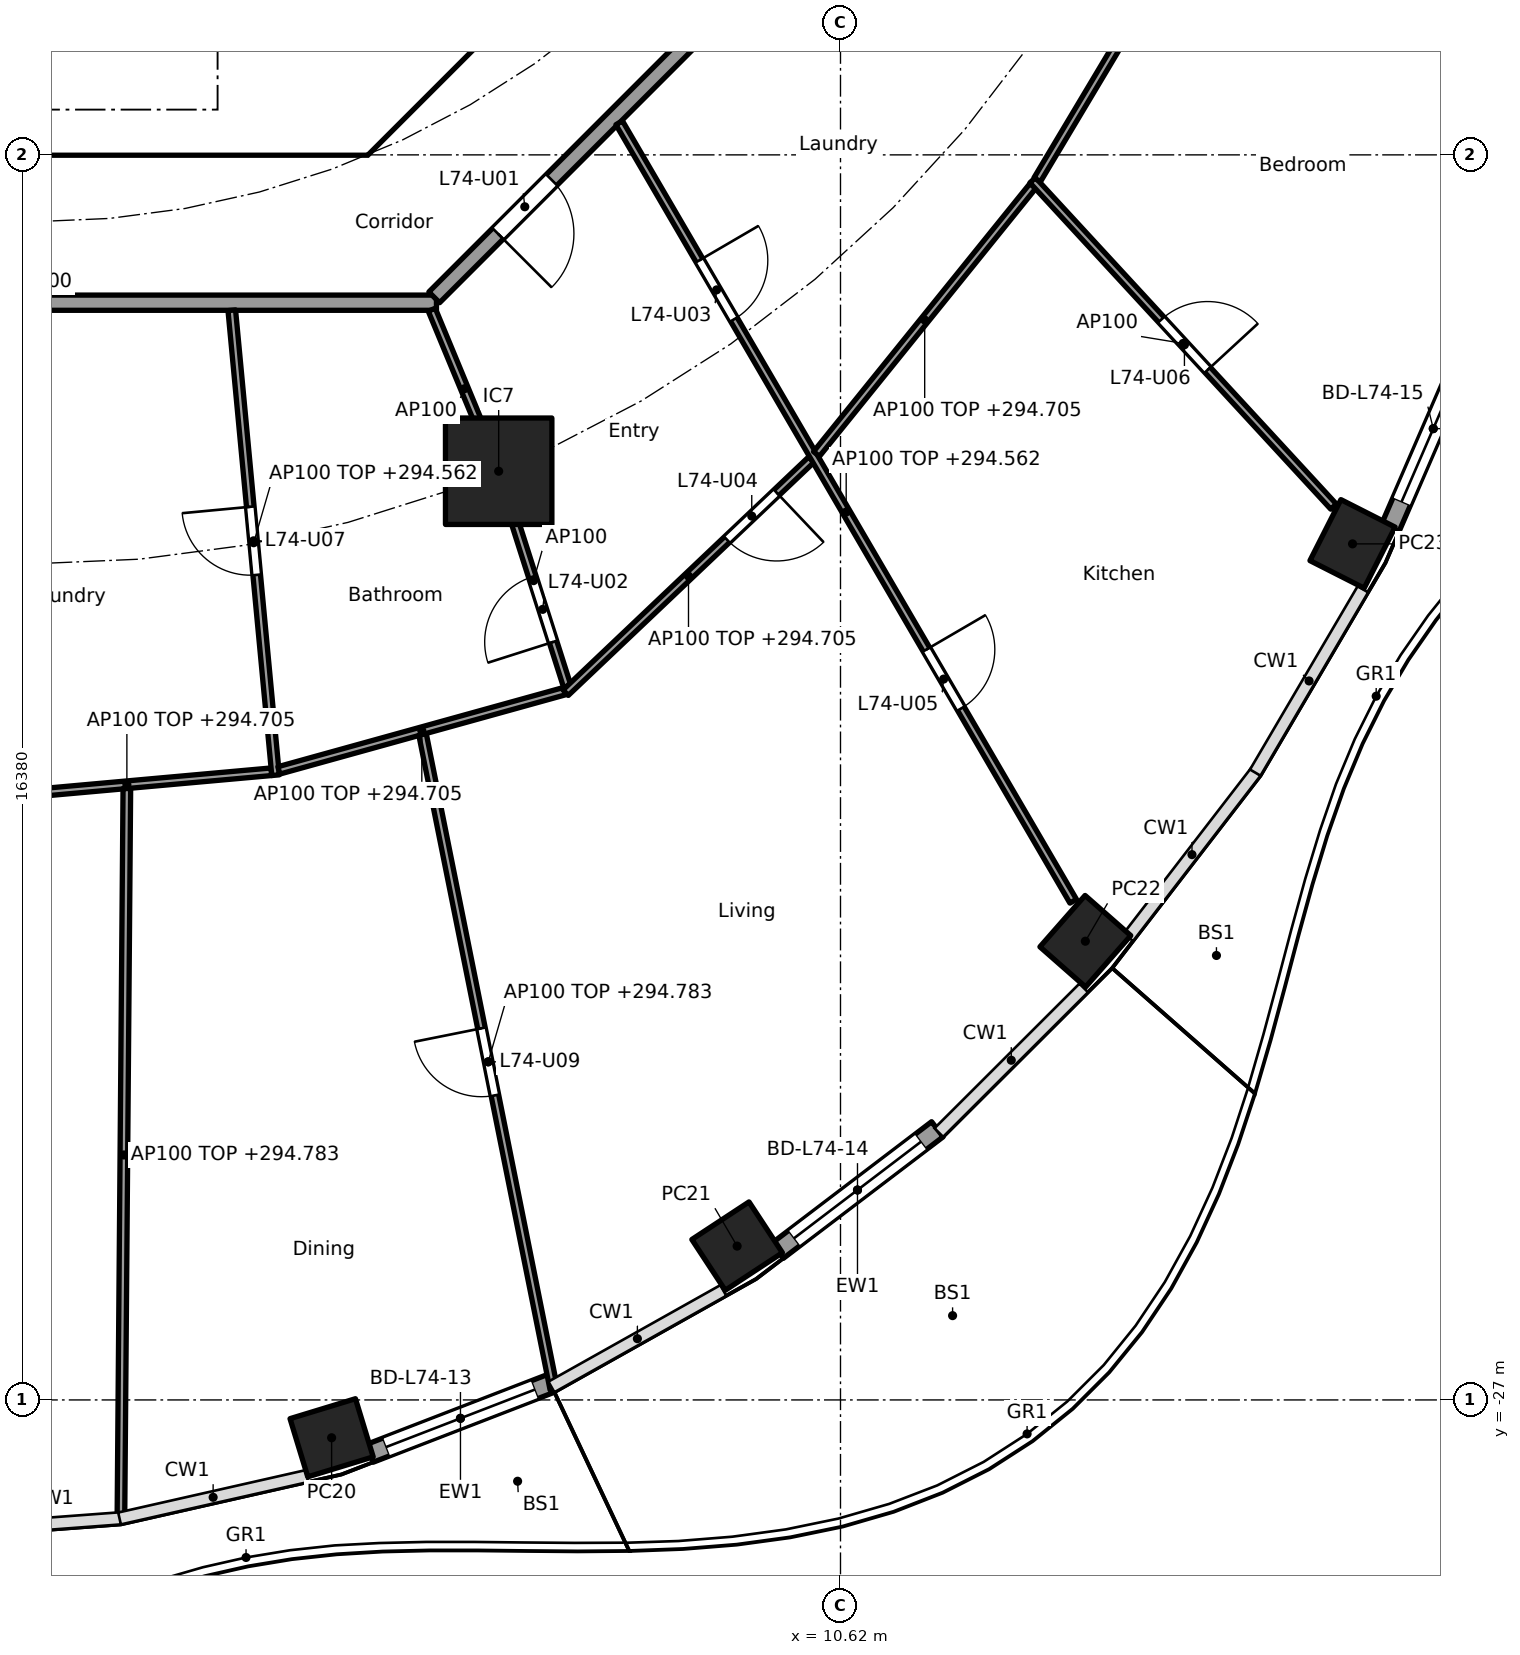
"""IFC4 building model, lengths in metres.
Left out: names, types, materials, properties, quantities, classifications, styles, units other than length and angle.
Written with IfcOpenShell. Run it as: python <this file> out.ifc"""

import sys

from ifc_helpers import new_model, si_unit, direction, frame, frame_2d, origin, origin_2d, place, context, subcontext, project, spatial, polyline, rectangle, hollow_rectangle, outline, extrude, element, fill, save


model = new_model("IFC4")
c1 = context("Model", 3, precision=1e-05, world=origin(), true_north=direction((0.0, 1.0)))
c2 = subcontext(c1, "Body", "Model", "MODEL_VIEW")
j1 = project(units=[si_unit("LENGTHUNIT", "METRE"), si_unit("PLANEANGLEUNIT", "RADIAN")], contexts=[c1])
p1 = place(None, origin())
s1 = spatial("IfcSite", under=j1, at=p1, CompositionType="ELEMENT")
p2 = place(p1, origin())
s2 = spatial("IfcBuilding", under=s1, at=p2, CompositionType="ELEMENT")
p3 = place(p2, frame((0.0, 0.0, 291.8)))
s3 = spatial("IfcBuildingStorey", under=s2, at=p3, CompositionType="ELEMENT", Elevation=291.8)
for number, where, z_axis, x_axis in (
    (1, (3.925, -27.498, 0.0), (0.0, 0.0, 1.0), (0.957, 0.292, 0.0)),
    (2, (9.26, -24.976, 0.0), (0.0, 0.0, 1.0), (0.836, 0.549, 0.0)),
    (3, (13.841, -20.965, 0.0), (0.0, 0.0, 1.0), (0.66, 0.751, 0.0)),
    (4, (17.356, -15.738, 0.0), (0.0, 0.0, 1.0), (0.452, 0.892, 0.0)),
):
    element("IfcColumn", number, at=place(p3, frame(where, z_axis=z_axis, x_axis=x_axis)), inside=s3, PredefinedType="COLUMN", context=c2, shape_type="SweptSolid", body=[
        extrude(hollow_rectangle(XDim=0.9, YDim=0.8, WallThickness=0.028, at=origin_2d()), origin(), (0.0, 0.0, 1.0), 3.7),
    ])
p4 = place(p3, frame((6.123, -14.782, 0.0), z_axis=(0.0, 0.0, 1.0), x_axis=(1.0, 0.0, 0.0)))
e5 = element("IfcColumn", 5, at=p4, inside=s3, PredefinedType="COLUMN", context=c2, shape_type="SweptSolid", body=[
    extrude(rectangle(XDim=1.4, YDim=1.4, at=origin_2d()), origin(), (0.0, 0.0, 1.0), 3.7),
])
p5 = place(p3, frame((6.811, -26.782, 0.0), z_axis=(0.0, 0.0, 1.0), x_axis=(-0.93282223778, -0.360336887792, 0.0)))
e6 = element("IfcWall", 6, at=p5, inside=s3, PredefinedType="SOLIDWALL", context=c2, shape_type="SweptSolid", body=[
    extrude(rectangle(XDim=2.554, YDim=0.25, at=frame_2d((1.277, 0.0))), origin(), (0.0, 0.0, 1.0), 3.44),
])
p6 = place(p5, frame((0.227, 0.0, 0.0)))
e7 = element("IfcOpeningElement", 7, at=p6, cuts=e6, PredefinedType="OPENING", context=c2, shape_type="SweptSolid", body=[
    extrude(rectangle(XDim=2.1, YDim=2.4, at=frame_2d((1.05, 1.2))), frame((0.0, 0.135, 0.0), z_axis=(0.0, -1.0, 0.0), x_axis=(1.0, 0.0, 0.0)), (0.0, 0.0, 1.0), 0.27),
])
p7 = place(p3, frame((11.895, -23.439, 0.0), z_axis=(0.0, 0.0, 1.0), x_axis=(-0.796055284084, -0.605223912847, 0.0)))
e8 = element("IfcWall", 8, at=p7, inside=s3, PredefinedType="SOLIDWALL", context=c2, shape_type="SweptSolid", body=[
    extrude(rectangle(XDim=2.641, YDim=0.25, at=frame_2d((1.32, 0.0))), origin(), (0.0, 0.0, 1.0), 3.44),
])
p8 = place(p7, frame((0.27, 0.0, 0.0)))
e9 = element("IfcOpeningElement", 9, at=p8, cuts=e8, PredefinedType="OPENING", context=c2, shape_type="SweptSolid", body=[
    extrude(rectangle(XDim=2.1, YDim=2.4, at=frame_2d((1.05, 1.2))), frame((0.0, 0.135, 0.0), z_axis=(0.0, -1.0, 0.0), x_axis=(1.0, 0.0, 0.0)), (0.0, 0.0, 1.0), 0.27),
])
p9 = place(p3, frame((18.983, -12.918, 0.0), z_axis=(0.0, 0.0, 1.0), x_axis=(-0.397597791596, -0.9175598052, 0.0)))
e10 = element("IfcWall", 10, at=p9, inside=s3, PredefinedType="SOLIDWALL", context=c2, shape_type="SweptSolid", body=[
    extrude(rectangle(XDim=2.841, YDim=0.25, at=frame_2d((1.42, 0.0))), origin(), (0.0, 0.0, 1.0), 3.44),
])
p10 = place(p9, frame((0.371, 0.0, 0.0)))
e11 = element("IfcOpeningElement", 11, at=p10, cuts=e10, PredefinedType="OPENING", context=c2, shape_type="SweptSolid", body=[
    extrude(rectangle(XDim=2.1, YDim=2.4, at=frame_2d((1.05, 1.2))), frame((0.0, 0.135, 0.0), z_axis=(0.0, -1.0, 0.0), x_axis=(1.0, 0.0, 0.0)), (0.0, 0.0, 1.0), 0.27),
])
p11 = place(p3, frame((4.613, -9.988, 0.0), z_axis=(0.0, 0.0, 1.0), x_axis=(0.707106781187, 0.707106781187, 0.0)))
e12 = element("IfcWall", 12, at=p11, inside=s3, PredefinedType="SHEAR", context=c2, shape_type="SweptSolid", body=[
    extrude(rectangle(XDim=7.602, YDim=0.6, at=frame_2d((3.801, 0.0))), origin(), (0.0, 0.0, 1.0), 3.44),
])
p12 = place(p11, frame((3.201, 0.0, 0.0)))
e13 = element("IfcOpeningElement", 13, at=p12, cuts=e12, PredefinedType="OPENING", context=c2, shape_type="SweptSolid", body=[
    extrude(rectangle(XDim=1.2, YDim=2.1, at=frame_2d((0.6, 1.05))), frame((0.0, 0.31, 0.0), z_axis=(0.0, -1.0, 0.0), x_axis=(1.0, 0.0, 0.0)), (0.0, 0.0, 1.0), 0.62),
])
p13 = place(p3, frame((4.0, -10.025, 0.0), z_axis=(0.0, 0.0, 1.0), x_axis=(0.0, 1.0, 0.0)))
e14 = element("IfcWall", 14, at=p13, inside=s3, PredefinedType="SOLIDWALL", context=c2, shape_type="SweptSolid", body=[
    extrude(rectangle(XDim=3.0, YDim=0.2, at=frame_2d((1.5, 0.0))), origin(), (0.0, 0.0, 1.0), 3.44),
])
p14 = place(p13, frame((0.975, 0.0, 0.0)))
e15 = element("IfcOpeningElement", 15, at=p14, cuts=e14, PredefinedType="OPENING", context=c2, shape_type="SweptSolid", body=[
    extrude(rectangle(XDim=1.1, YDim=2.1, at=frame_2d((0.55, 1.05))), frame((0.0, 0.11, 0.0), z_axis=(0.0, -1.0, 0.0), x_axis=(1.0, 0.0, 0.0)), (0.0, 0.0, 1.0), 0.22),
])
p15 = place(p3, origin())
e16 = element("IfcWall", 16, at=p15, inside=s3, PredefinedType="SHEAR", context=c2, shape_type="SweptSolid", body=[
    extrude(outline(polyline([(-4.152, -10.025), (4.152, -10.025), (4.401, -9.776), (4.825, -10.2), (4.401, -10.625), (-4.401, -10.625), (-4.825, -10.2), (-4.401, -9.776), (-4.152, -10.025)])), origin(), (0.0, 0.0, 1.0), 3.44),
])
p16 = place(p3, frame((14.823, -6.151, 0.0), z_axis=(0.0, 0.0, 1.0), x_axis=(0.821435065081, -0.570302054928, 0.0)))
e17 = element("IfcWall", 17, at=p16, inside=s3, PredefinedType="PARTITIONING", context=c2, shape_type="SweptSolid", body=[
    extrude(rectangle(XDim=5.368, YDim=0.2, at=frame_2d((2.684, 0.0))), origin(), (0.0, 0.0, 1.0), 3.44),
])
p17 = place(p3, frame((-5.104, -12.565, 0.0), z_axis=(0.0, 0.0, 1.0), x_axis=(1.0, 0.0, 0.0)))
e18 = element("IfcWall", 18, at=p17, inside=s3, PredefinedType="PARTITIONING", context=c2, shape_type="SweptSolid", body=[
    extrude(rectangle(XDim=10.409, YDim=0.2, at=frame_2d((5.205, 0.0))), origin(), (0.0, 0.0, 1.0), 3.44),
])
p18 = place(p3, frame((5.275, -12.494, 0.0), z_axis=(0.0, 0.0, 1.0), x_axis=(0.707106781187, 0.707106781187, 0.0)))
e19 = element("IfcWall", 19, at=p18, inside=s3, PredefinedType="PARTITIONING", context=c2, shape_type="SweptSolid", body=[
    extrude(rectangle(XDim=10.409, YDim=0.2, at=frame_2d((5.205, 0.0))), origin(), (0.0, 0.0, 1.0), 3.44),
])
p19 = place(p18, frame((1.185, 0.0, 0.0)))
e20 = element("IfcOpeningElement", 20, at=p19, cuts=e19, PredefinedType="OPENING", context=c2, shape_type="SweptSolid", body=[
    extrude(rectangle(XDim=1.0, YDim=2.1, at=frame_2d((0.5, 1.05))), frame((0.0, 0.11, 0.0), z_axis=(0.0, -1.0, 0.0), x_axis=(1.0, 0.0, 0.0)), (0.0, 0.0, 1.0), 0.22),
])
p20 = place(p3, frame((-0.67, -19.077, 0.0), z_axis=(0.0, 0.0, 1.0), x_axis=(0.995986472869, 0.089503887414, 0.0)))
e21 = element("IfcWall", 21, at=p20, inside=s3, PredefinedType="PARTITIONING", context=c2, shape_type="SweptSolid", body=[
    extrude(rectangle(XDim=3.819, YDim=0.1, at=frame_2d((1.909, 0.0))), origin(), (0.0, 0.0, 1.0), 2.905),
])
p21 = place(p3, frame((1.231, -18.957, 0.0), z_axis=(0.0, 0.0, 1.0), x_axis=(-0.008128577452, -0.999966962569, 0.0)))
e22 = element("IfcWall", 22, at=p21, inside=s3, PredefinedType="PARTITIONING", context=c2, shape_type="SweptSolid", body=[
    extrude(rectangle(XDim=9.641, YDim=0.1, at=frame_2d((4.821, 0.0))), origin(), (0.0, 0.0, 1.0), 2.983),
])
p22 = place(p3, frame((2.612, -12.664, 0.0), z_axis=(0.0, 0.0, 1.0), x_axis=(0.093781393779, -0.995592813444, 0.0)))
e23 = element("IfcWall", 23, at=p22, inside=s3, PredefinedType="PARTITIONING", context=c2, shape_type="SweptSolid", body=[
    extrude(rectangle(XDim=6.144, YDim=0.1, at=frame_2d((3.072, 0.0))), origin(), (0.0, 0.0, 1.0), 2.762),
])
p23 = place(p22, frame((2.597, 0.0, 0.0)))
e24 = element("IfcOpeningElement", 24, at=p23, cuts=e23, PredefinedType="OPENING", context=c2, shape_type="SweptSolid", body=[
    extrude(rectangle(XDim=0.9, YDim=2.1, at=frame_2d((0.45, 1.05))), frame((0.0, 0.06, 0.0), z_axis=(0.0, -1.0, 0.0), x_axis=(1.0, 0.0, 0.0)), (0.0, 0.0, 1.0), 0.12),
])
p24 = place(p3, frame((3.231, -18.718, 0.0), z_axis=(0.0, 0.0, 1.0), x_axis=(0.963601204771, 0.267343820136, 0.0)))
e25 = element("IfcWall", 25, at=p24, inside=s3, PredefinedType="PARTITIONING", context=c2, shape_type="SweptSolid", body=[
    extrude(rectangle(XDim=3.903, YDim=0.1, at=frame_2d((1.952, 0.0))), origin(), (0.0, 0.0, 1.0), 2.905),
])
p25 = place(p3, frame((5.122, -18.245, 0.0), z_axis=(0.0, 0.0, 1.0), x_axis=(0.196554332808, -0.980492934322, 0.0)))
e26 = element("IfcWall", 26, at=p25, inside=s3, PredefinedType="PARTITIONING", context=c2, shape_type="SweptSolid", body=[
    extrude(rectangle(XDim=8.785, YDim=0.1, at=frame_2d((4.393, 0.0))), origin(), (0.0, 0.0, 1.0), 2.983),
])
p26 = place(p25, frame((3.943, 0.0, 0.0)))
e27 = element("IfcOpeningElement", 27, at=p26, cuts=e26, PredefinedType="OPENING", context=c2, shape_type="SweptSolid", body=[
    extrude(rectangle(XDim=0.9, YDim=2.1, at=frame_2d((0.45, 1.05))), frame((0.0, 0.06, 0.0), z_axis=(0.0, -1.0, 0.0), x_axis=(1.0, 0.0, 0.0)), (0.0, 0.0, 1.0), 0.12),
])
p27 = place(p3, frame((5.243, -12.657, 0.0), z_axis=(0.0, 0.0, 1.0), x_axis=(0.382719158442, -0.923864733477, 0.0)))
e28 = element("IfcWall", 28, at=p27, inside=s3, PredefinedType="PARTITIONING", context=c2, shape_type="SweptSolid", body=[
    extrude(rectangle(XDim=2.25, YDim=0.1, at=frame_2d((1.125, 0.0))), origin(), (0.0, 0.0, 1.0), 3.44),
])
p28 = place(p3, frame((6.138, -14.83, 0.0), z_axis=(0.0, 0.0, 1.0), x_axis=(0.303665801704, -0.952778610631, 0.0)))
e29 = element("IfcWall", 29, at=p28, inside=s3, PredefinedType="PARTITIONING", context=c2, shape_type="SweptSolid", body=[
    extrude(rectangle(XDim=2.922, YDim=0.1, at=frame_2d((1.461, 0.0))), origin(), (0.0, 0.0, 1.0), 3.44),
])
p29 = place(p28, frame((1.407, 0.0, 0.0)))
e30 = element("IfcOpeningElement", 30, at=p29, cuts=e29, PredefinedType="OPENING", context=c2, shape_type="SweptSolid", body=[
    extrude(rectangle(XDim=0.9, YDim=2.1, at=frame_2d((0.45, 1.05))), frame((0.0, 0.06, 0.0), z_axis=(0.0, -1.0, 0.0), x_axis=(1.0, 0.0, 0.0)), (0.0, 0.0, 1.0), 0.12),
])
p30 = place(p3, frame((7.004, -17.695, 0.0), z_axis=(0.0, 0.0, 1.0), x_axis=(0.725438442765, 0.68828705186, 0.0)))
e31 = element("IfcWall", 31, at=p30, inside=s3, PredefinedType="PARTITIONING", context=c2, shape_type="SweptSolid", body=[
    extrude(rectangle(XDim=4.456, YDim=0.1, at=frame_2d((2.228, 0.0))), origin(), (0.0, 0.0, 1.0), 2.905),
])
p31 = place(p30, frame((2.925, 0.0, 0.0)))
e32 = element("IfcOpeningElement", 32, at=p31, cuts=e31, PredefinedType="OPENING", context=c2, shape_type="SweptSolid", body=[
    extrude(rectangle(XDim=0.9, YDim=2.1, at=frame_2d((0.45, 1.05))), frame((0.0, 0.06, 0.0), z_axis=(0.0, -1.0, 0.0), x_axis=(1.0, 0.0, 0.0)), (0.0, 0.0, 1.0), 0.12),
])
p32 = place(p3, frame((7.708, -10.198, 0.0), z_axis=(0.0, 0.0, 1.0), x_axis=(0.503839015963, -0.863797572347, 0.0)))
e33 = element("IfcWall", 33, at=p32, inside=s3, PredefinedType="PARTITIONING", context=c2, shape_type="SweptSolid", body=[
    extrude(rectangle(XDim=11.856, YDim=0.1, at=frame_2d((5.928, 0.0))), origin(), (0.0, 0.0, 1.0), 2.762),
])
p33 = place(p32, frame((2.095, 0.0, 0.0)))
e34 = element("IfcOpeningElement", 34, at=p33, cuts=e33, PredefinedType="OPENING", context=c2, shape_type="SweptSolid", body=[
    extrude(rectangle(XDim=0.9, YDim=2.1, at=frame_2d((0.45, 1.05))), frame((0.0, 0.06, 0.0), z_axis=(0.0, -1.0, 0.0), x_axis=(1.0, 0.0, 0.0)), (0.0, 0.0, 1.0), 0.12),
])
p34 = place(p32, frame((8.023, 0.0, 0.0)))
e35 = element("IfcOpeningElement", 35, at=p34, cuts=e33, PredefinedType="OPENING", context=c2, shape_type="SweptSolid", body=[
    extrude(rectangle(XDim=0.9, YDim=2.1, at=frame_2d((0.45, 1.05))), frame((0.0, 0.06, 0.0), z_axis=(0.0, -1.0, 0.0), x_axis=(1.0, 0.0, 0.0)), (0.0, 0.0, 1.0), 0.12),
])
p35 = place(p3, frame((10.304, -14.555, 0.0), z_axis=(0.0, 0.0, 1.0), x_axis=(0.628170338674, 0.778075848237, 0.0)))
e36 = element("IfcWall", 36, at=p35, inside=s3, PredefinedType="PARTITIONING", context=c2, shape_type="SweptSolid", body=[
    extrude(rectangle(XDim=4.532, YDim=0.1, at=frame_2d((2.266, 0.0))), origin(), (0.0, 0.0, 1.0), 2.905),
])
p36 = place(p3, frame((13.149, -10.953, 0.0), z_axis=(0.0, 0.0, 1.0), x_axis=(0.677762562884, -0.735280836384, 0.0)))
e37 = element("IfcWall", 37, at=p36, inside=s3, PredefinedType="PARTITIONING", context=c2, shape_type="SweptSolid", body=[
    extrude(rectangle(XDim=5.841, YDim=0.1, at=frame_2d((2.92, 0.0))), origin(), (0.0, 0.0, 1.0), 3.44),
])
p37 = place(p36, frame((2.495, 0.0, 0.0)))
e38 = element("IfcOpeningElement", 38, at=p37, cuts=e37, PredefinedType="OPENING", context=c2, shape_type="SweptSolid", body=[
    extrude(rectangle(XDim=0.9, YDim=2.1, at=frame_2d((0.45, 1.05))), frame((0.0, 0.06, 0.0), z_axis=(0.0, -1.0, 0.0), x_axis=(1.0, 0.0, 0.0)), (0.0, 0.0, 1.0), 0.12),
])
p38 = place(p3, frame((13.208, -10.947, 0.0), z_axis=(0.0, 0.0, 1.0), x_axis=(0.512726452516, 0.858552028063, 0.0)))
e39 = element("IfcWall", 39, at=p38, inside=s3, PredefinedType="PARTITIONING", context=c2, shape_type="SweptSolid", body=[
    extrude(rectangle(XDim=4.772, YDim=0.1, at=frame_2d((2.386, 0.0))), origin(), (0.0, 0.0, 1.0), 2.905),
])
p39 = place(p6, origin())
e40 = element("IfcDoor", 40, at=p39, inside=s3, OperationType="SLIDING_TO_LEFT", PredefinedType="DOOR", context=c2, shape_type="SweptSolid", body=[
    extrude(rectangle(XDim=2.1, YDim=2.4, at=frame_2d((1.05, 1.2))), frame((0.0, 0.025, 0.0), z_axis=(0.0, -1.0, 0.0), x_axis=(1.0, 0.0, 0.0)), (0.0, 0.0, 1.0), 0.05),
])
fill(e7, e40)
p40 = place(p8, origin())
e41 = element("IfcDoor", 41, at=p40, inside=s3, OperationType="SLIDING_TO_LEFT", PredefinedType="DOOR", context=c2, shape_type="SweptSolid", body=[
    extrude(rectangle(XDim=2.1, YDim=2.4, at=frame_2d((1.05, 1.2))), frame((0.0, 0.025, 0.0), z_axis=(0.0, -1.0, 0.0), x_axis=(1.0, 0.0, 0.0)), (0.0, 0.0, 1.0), 0.05),
])
fill(e9, e41)
p41 = place(p10, origin())
e42 = element("IfcDoor", 42, at=p41, inside=s3, OperationType="SLIDING_TO_LEFT", PredefinedType="DOOR", context=c2, shape_type="SweptSolid", body=[
    extrude(rectangle(XDim=2.1, YDim=2.4, at=frame_2d((1.05, 1.2))), frame((0.0, 0.025, 0.0), z_axis=(0.0, -1.0, 0.0), x_axis=(1.0, 0.0, 0.0)), (0.0, 0.0, 1.0), 0.05),
])
fill(e11, e42)
p42 = place(p19, frame((1.0, 0.0, 0.0), x_axis=(-1.0, 0.0, 0.0)))
e43 = element("IfcDoor", 43, at=p42, inside=s3, OperationType="SINGLE_SWING_RIGHT", PredefinedType="DOOR", context=c2, shape_type="SweptSolid", body=[
    extrude(rectangle(XDim=1.0, YDim=2.1, at=frame_2d((0.5, 1.05))), frame((0.0, 0.025, 0.0), z_axis=(0.0, -1.0, 0.0), x_axis=(1.0, 0.0, 0.0)), (0.0, 0.0, 1.0), 0.05),
])
fill(e20, e43)
p43 = place(p29, frame((0.9, 0.0, 0.0), x_axis=(-1.0, 0.0, 0.0)))
e44 = element("IfcDoor", 44, at=p43, inside=s3, OperationType="SINGLE_SWING_LEFT", PredefinedType="DOOR", context=c2, shape_type="SweptSolid", body=[
    extrude(rectangle(XDim=0.9, YDim=2.1, at=frame_2d((0.45, 1.05))), frame((0.0, 0.025, 0.0), z_axis=(0.0, -1.0, 0.0), x_axis=(1.0, 0.0, 0.0)), (0.0, 0.0, 1.0), 0.05),
])
fill(e30, e44)
p44 = place(p33, origin())
e45 = element("IfcDoor", 45, at=p44, inside=s3, OperationType="SINGLE_SWING_LEFT", PredefinedType="DOOR", context=c2, shape_type="SweptSolid", body=[
    extrude(rectangle(XDim=0.9, YDim=2.1, at=frame_2d((0.45, 1.05))), frame((0.0, 0.025, 0.0), z_axis=(0.0, -1.0, 0.0), x_axis=(1.0, 0.0, 0.0)), (0.0, 0.0, 1.0), 0.05),
])
fill(e34, e45)
p45 = place(p31, frame((0.9, 0.0, 0.0), x_axis=(-1.0, 0.0, 0.0)))
e46 = element("IfcDoor", 46, at=p45, inside=s3, OperationType="SINGLE_SWING_LEFT", PredefinedType="DOOR", context=c2, shape_type="SweptSolid", body=[
    extrude(rectangle(XDim=0.9, YDim=2.1, at=frame_2d((0.45, 1.05))), frame((0.0, 0.025, 0.0), z_axis=(0.0, -1.0, 0.0), x_axis=(1.0, 0.0, 0.0)), (0.0, 0.0, 1.0), 0.05),
])
fill(e32, e46)
p46 = place(p34, origin())
e47 = element("IfcDoor", 47, at=p46, inside=s3, OperationType="SINGLE_SWING_LEFT", PredefinedType="DOOR", context=c2, shape_type="SweptSolid", body=[
    extrude(rectangle(XDim=0.9, YDim=2.1, at=frame_2d((0.45, 1.05))), frame((0.0, 0.025, 0.0), z_axis=(0.0, -1.0, 0.0), x_axis=(1.0, 0.0, 0.0)), (0.0, 0.0, 1.0), 0.05),
])
fill(e35, e47)
p47 = place(p37, origin())
e48 = element("IfcDoor", 48, at=p47, inside=s3, OperationType="SINGLE_SWING_RIGHT", PredefinedType="DOOR", context=c2, shape_type="SweptSolid", body=[
    extrude(rectangle(XDim=0.9, YDim=2.1, at=frame_2d((0.45, 1.05))), frame((0.0, 0.025, 0.0), z_axis=(0.0, -1.0, 0.0), x_axis=(1.0, 0.0, 0.0)), (0.0, 0.0, 1.0), 0.05),
])
fill(e38, e48)
p48 = place(p23, frame((0.9, 0.0, 0.0), x_axis=(-1.0, 0.0, 0.0)))
e49 = element("IfcDoor", 49, at=p48, inside=s3, OperationType="SINGLE_SWING_RIGHT", PredefinedType="DOOR", context=c2, shape_type="SweptSolid", body=[
    extrude(rectangle(XDim=0.9, YDim=2.1, at=frame_2d((0.45, 1.05))), frame((0.0, 0.025, 0.0), z_axis=(0.0, -1.0, 0.0), x_axis=(1.0, 0.0, 0.0)), (0.0, 0.0, 1.0), 0.05),
])
fill(e24, e49)
p49 = place(p26, frame((0.9, 0.0, 0.0), x_axis=(-1.0, 0.0, 0.0)))
e50 = element("IfcDoor", 50, at=p49, inside=s3, OperationType="SINGLE_SWING_RIGHT", PredefinedType="DOOR", context=c2, shape_type="SweptSolid", body=[
    extrude(rectangle(XDim=0.9, YDim=2.1, at=frame_2d((0.45, 1.05))), frame((0.0, 0.025, 0.0), z_axis=(0.0, -1.0, 0.0), x_axis=(1.0, 0.0, 0.0)), (0.0, 0.0, 1.0), 0.05),
])
fill(e27, e50)
save(model, sys.argv[1])
